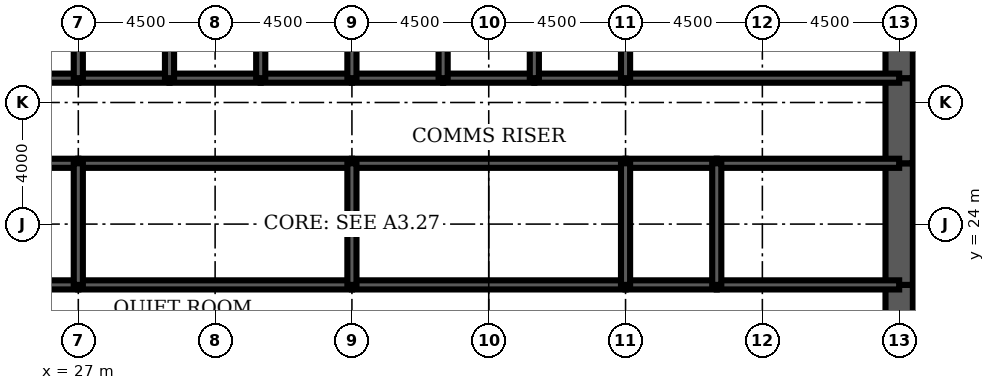
"""IFC4 building model, lengths in metres.
Left out: names, types, materials, properties, quantities, classifications, styles, units other than length and angle.
Written with IfcOpenShell. Run it as: python <this file> out.ifc"""

import sys

from ifc_helpers import new_model, si_unit, direction, frame, frame_2d, origin, place, context, subcontext, project, spatial, rectangle, extrude, element, fill, save


model = new_model("IFC4")
c1 = context("Model", 3, precision=1e-05, world=origin(), true_north=direction((0.0, 1.0)))
c2 = subcontext(c1, "Body", "Model", "MODEL_VIEW")
j1 = project(units=[si_unit("LENGTHUNIT", "METRE"), si_unit("PLANEANGLEUNIT", "RADIAN")], contexts=[c1])
p1 = place(None, origin())
s1 = spatial("IfcSite", under=j1, at=p1, CompositionType="ELEMENT")
p2 = place(p1, origin())
s2 = spatial("IfcBuilding", under=s1, at=p2, CompositionType="ELEMENT")
p3 = place(p2, frame((0.0, 0.0, 117.3)))
s3 = spatial("IfcBuildingStorey", under=s2, at=p3, CompositionType="ELEMENT", Elevation=117.3)
p4 = place(p3, frame((54.0, 19.2, 0.0), z_axis=(0.0, 0.0, 1.0), x_axis=(0.0, 1.0, 0.0)))
e1 = element("IfcWall", 1, at=p4, inside=s3, PredefinedType="SHEAR", context=c2, shape_type="SweptSolid", body=[
    extrude(rectangle(XDim=2.8, YDim=0.9, at=frame_2d((1.4, 0.0))), origin(), (0.0, 0.0, 1.0), 4.2),
])
p5 = place(p4, frame((0.4, 0.0, 0.0)))
e2 = element("IfcOpeningElement", 2, at=p5, cuts=e1, PredefinedType="OPENING", context=c2, shape_type="SweptSolid", body=[
    extrude(rectangle(XDim=1.8, YDim=2.1, at=frame_2d((0.9, 1.05))), frame((0.0, 0.46, 0.0), z_axis=(0.0, -1.0, 0.0), x_axis=(1.0, 0.0, 0.0)), (0.0, 0.0, 1.0), 0.92),
])
p6 = place(p3, frame((54.0, 22.0, 0.0), z_axis=(0.0, 0.0, 1.0), x_axis=(0.0, 1.0, 0.0)))
e3 = element("IfcWall", 3, at=p6, inside=s3, PredefinedType="SHEAR", context=c2, shape_type="SweptSolid", body=[
    extrude(rectangle(XDim=4.0, YDim=0.9, at=frame_2d((2.0, 0.0))), origin(), (0.0, 0.0, 1.0), 4.2),
])
p7 = place(p3, frame((54.0, 26.0, 0.0), z_axis=(0.0, 0.0, 1.0), x_axis=(0.0, 1.0, 0.0)))
e4 = element("IfcWall", 4, at=p7, inside=s3, PredefinedType="SHEAR", context=c2, shape_type="SweptSolid", body=[
    extrude(rectangle(XDim=2.8, YDim=0.9, at=frame_2d((1.4, 0.0))), origin(), (0.0, 0.0, 1.0), 4.2),
])
p8 = place(p7, frame((0.6, 0.0, 0.0)))
e5 = element("IfcOpeningElement", 5, at=p8, cuts=e4, PredefinedType="OPENING", context=c2, shape_type="SweptSolid", body=[
    extrude(rectangle(XDim=1.8, YDim=2.1, at=frame_2d((0.9, 1.05))), frame((0.0, 0.46, 0.0), z_axis=(0.0, -1.0, 0.0), x_axis=(1.0, 0.0, 0.0)), (0.0, 0.0, 1.0), 0.92),
])
p9 = place(p3, frame((54.0, 28.8, 0.0), z_axis=(0.0, 0.0, 1.0), x_axis=(0.0, 1.0, 0.0)))
e6 = element("IfcWall", 6, at=p9, inside=s3, PredefinedType="SHEAR", context=c2, shape_type="SweptSolid", body=[
    extrude(rectangle(XDim=3.2, YDim=0.9, at=frame_2d((1.6, 0.0))), origin(), (0.0, 0.0, 1.0), 4.2),
])
p10 = place(p3, frame((18.0, 28.8, 0.0), z_axis=(0.0, 0.0, 1.0), x_axis=(1.0, 0.0, 0.0)))
e7 = element("IfcWall", 7, at=p10, inside=s3, PredefinedType="SOLIDWALL", context=c2, shape_type="SweptSolid", body=[
    extrude(rectangle(XDim=9.0, YDim=0.3, at=frame_2d((4.5, 0.0))), origin(), (0.0, 0.0, 1.0), 4.2),
])
p11 = place(p10, frame((0.65, 0.0, 0.0)))
e8 = element("IfcOpeningElement", 8, at=p11, cuts=e7, PredefinedType="OPENING", context=c2, shape_type="SweptSolid", body=[
    extrude(rectangle(XDim=1.0, YDim=2.1, at=frame_2d((0.5, 1.05))), frame((0.0, 0.16, 0.0), z_axis=(0.0, -1.0, 0.0), x_axis=(1.0, 0.0, 0.0)), (0.0, 0.0, 1.0), 0.32),
])
p12 = place(p3, frame((27.0, 28.8, 0.0), z_axis=(0.0, 0.0, 1.0), x_axis=(1.0, 0.0, 0.0)))
e9 = element("IfcWall", 9, at=p12, inside=s3, PredefinedType="SOLIDWALL", context=c2, shape_type="SweptSolid", body=[
    extrude(rectangle(XDim=3.0, YDim=0.3, at=frame_2d((1.5, 0.0))), origin(), (0.0, 0.0, 1.0), 4.2),
])
p13 = place(p12, frame((0.95, 0.0, 0.0)))
e10 = element("IfcOpeningElement", 10, at=p13, cuts=e9, PredefinedType="OPENING", context=c2, shape_type="SweptSolid", body=[
    extrude(rectangle(XDim=1.1, YDim=2.2, at=frame_2d((0.55, 1.1))), frame((0.0, 0.16, 0.0), z_axis=(0.0, -1.0, 0.0), x_axis=(1.0, 0.0, 0.0)), (0.0, 0.0, 1.0), 0.32),
])
p14 = place(p3, frame((30.0, 28.8, 0.0), z_axis=(0.0, 0.0, 1.0), x_axis=(1.0, 0.0, 0.0)))
e11 = element("IfcWall", 11, at=p14, inside=s3, PredefinedType="SOLIDWALL", context=c2, shape_type="SweptSolid", body=[
    extrude(rectangle(XDim=3.0, YDim=0.3, at=frame_2d((1.5, 0.0))), origin(), (0.0, 0.0, 1.0), 4.2),
])
p15 = place(p14, frame((0.95, 0.0, 0.0)))
e12 = element("IfcOpeningElement", 12, at=p15, cuts=e11, PredefinedType="OPENING", context=c2, shape_type="SweptSolid", body=[
    extrude(rectangle(XDim=1.1, YDim=2.2, at=frame_2d((0.55, 1.1))), frame((0.0, 0.16, 0.0), z_axis=(0.0, -1.0, 0.0), x_axis=(1.0, 0.0, 0.0)), (0.0, 0.0, 1.0), 0.32),
])
p16 = place(p3, frame((33.0, 28.8, 0.0), z_axis=(0.0, 0.0, 1.0), x_axis=(1.0, 0.0, 0.0)))
e13 = element("IfcWall", 13, at=p16, inside=s3, PredefinedType="SOLIDWALL", context=c2, shape_type="SweptSolid", body=[
    extrude(rectangle(XDim=3.0, YDim=0.3, at=frame_2d((1.5, 0.0))), origin(), (0.0, 0.0, 1.0), 4.2),
])
p17 = place(p16, frame((0.95, 0.0, 0.0)))
e14 = element("IfcOpeningElement", 14, at=p17, cuts=e13, PredefinedType="OPENING", context=c2, shape_type="SweptSolid", body=[
    extrude(rectangle(XDim=1.1, YDim=2.2, at=frame_2d((0.55, 1.1))), frame((0.0, 0.16, 0.0), z_axis=(0.0, -1.0, 0.0), x_axis=(1.0, 0.0, 0.0)), (0.0, 0.0, 1.0), 0.32),
])
for number, where, z_axis, x_axis in (
    (15, (36.0, 28.8, 0.0), (0.0, 0.0, 1.0), (1.0, 0.0, 0.0)),
    (16, (39.0, 28.8, 0.0), (0.0, 0.0, 1.0), (1.0, 0.0, 0.0)),
):
    element("IfcWall", number, at=place(p3, frame(where, z_axis=z_axis, x_axis=x_axis)), inside=s3, PredefinedType="SOLIDWALL", context=c2, shape_type="SweptSolid", body=[
        extrude(rectangle(XDim=3.0, YDim=0.3, at=frame_2d((1.5, 0.0))), origin(), (0.0, 0.0, 1.0), 4.2),
    ])
p18 = place(p3, frame((42.0, 28.8, 0.0), z_axis=(0.0, 0.0, 1.0), x_axis=(1.0, 0.0, 0.0)))
e17 = element("IfcWall", 17, at=p18, inside=s3, PredefinedType="SOLIDWALL", context=c2, shape_type="SweptSolid", body=[
    extrude(rectangle(XDim=3.0, YDim=0.3, at=frame_2d((1.5, 0.0))), origin(), (0.0, 0.0, 1.0), 4.2),
])
p19 = place(p18, frame((0.95, 0.0, 0.0)))
e18 = element("IfcOpeningElement", 18, at=p19, cuts=e17, PredefinedType="OPENING", context=c2, shape_type="SweptSolid", body=[
    extrude(rectangle(XDim=1.1, YDim=2.2, at=frame_2d((0.55, 1.1))), frame((0.0, 0.16, 0.0), z_axis=(0.0, -1.0, 0.0), x_axis=(1.0, 0.0, 0.0)), (0.0, 0.0, 1.0), 0.32),
])
p20 = place(p3, frame((45.0, 28.8, 0.0), z_axis=(0.0, 0.0, 1.0), x_axis=(1.0, 0.0, 0.0)))
e19 = element("IfcWall", 19, at=p20, inside=s3, PredefinedType="SOLIDWALL", context=c2, shape_type="SweptSolid", body=[
    extrude(rectangle(XDim=9.0, YDim=0.3, at=frame_2d((4.5, 0.0))), origin(), (0.0, 0.0, 1.0), 4.2),
])
p21 = place(p20, frame((7.35, 0.0, 0.0)))
e20 = element("IfcOpeningElement", 20, at=p21, cuts=e19, PredefinedType="OPENING", context=c2, shape_type="SweptSolid", body=[
    extrude(rectangle(XDim=1.0, YDim=2.1, at=frame_2d((0.5, 1.05))), frame((0.0, 0.16, 0.0), z_axis=(0.0, -1.0, 0.0), x_axis=(1.0, 0.0, 0.0)), (0.0, 0.0, 1.0), 0.32),
])
p22 = place(p3, frame((24.0, 22.0, 0.0), z_axis=(0.0, 0.0, 1.0), x_axis=(1.0, 0.0, 0.0)))
e21 = element("IfcWall", 21, at=p22, inside=s3, PredefinedType="SOLIDWALL", context=c2, shape_type="SweptSolid", body=[
    extrude(rectangle(XDim=3.0, YDim=0.3, at=frame_2d((1.5, 0.0))), origin(), (0.0, 0.0, 1.0), 4.2),
])
p23 = place(p22, frame((1.0, 0.0, 0.0)))
e22 = element("IfcOpeningElement", 22, at=p23, cuts=e21, PredefinedType="OPENING", context=c2, shape_type="SweptSolid", body=[
    extrude(rectangle(XDim=1.0, YDim=2.1, at=frame_2d((0.5, 1.05))), frame((0.0, 0.16, 0.0), z_axis=(0.0, -1.0, 0.0), x_axis=(1.0, 0.0, 0.0)), (0.0, 0.0, 1.0), 0.32),
])
p24 = place(p3, frame((27.0, 22.0, 0.0), z_axis=(0.0, 0.0, 1.0), x_axis=(1.0, 0.0, 0.0)))
e23 = element("IfcWall", 23, at=p24, inside=s3, PredefinedType="SOLIDWALL", context=c2, shape_type="SweptSolid", body=[
    extrude(rectangle(XDim=9.0, YDim=0.3, at=frame_2d((4.5, 0.0))), origin(), (0.0, 0.0, 1.0), 4.2),
])
p25 = place(p24, frame((4.0, 0.0, 0.0)))
e24 = element("IfcOpeningElement", 24, at=p25, cuts=e23, PredefinedType="OPENING", context=c2, shape_type="SweptSolid", body=[
    extrude(rectangle(XDim=1.0, YDim=2.1, at=frame_2d((0.5, 1.05))), frame((0.0, 0.16, 0.0), z_axis=(0.0, -1.0, 0.0), x_axis=(1.0, 0.0, 0.0)), (0.0, 0.0, 1.0), 0.32),
])
p26 = place(p3, frame((36.0, 22.0, 0.0), z_axis=(0.0, 0.0, 1.0), x_axis=(1.0, 0.0, 0.0)))
e25 = element("IfcWall", 25, at=p26, inside=s3, PredefinedType="SOLIDWALL", context=c2, shape_type="SweptSolid", body=[
    extrude(rectangle(XDim=9.0, YDim=0.3, at=frame_2d((4.5, 0.0))), origin(), (0.0, 0.0, 1.0), 4.2),
])
p27 = place(p26, frame((4.0, 0.0, 0.0)))
e26 = element("IfcOpeningElement", 26, at=p27, cuts=e25, PredefinedType="OPENING", context=c2, shape_type="SweptSolid", body=[
    extrude(rectangle(XDim=1.0, YDim=2.1, at=frame_2d((0.5, 1.05))), frame((0.0, 0.16, 0.0), z_axis=(0.0, -1.0, 0.0), x_axis=(1.0, 0.0, 0.0)), (0.0, 0.0, 1.0), 0.32),
])
p28 = place(p3, frame((45.0, 22.0, 0.0), z_axis=(0.0, 0.0, 1.0), x_axis=(1.0, 0.0, 0.0)))
e27 = element("IfcWall", 27, at=p28, inside=s3, PredefinedType="SOLIDWALL", context=c2, shape_type="SweptSolid", body=[
    extrude(rectangle(XDim=3.0, YDim=0.3, at=frame_2d((1.5, 0.0))), origin(), (0.0, 0.0, 1.0), 4.2),
])
p29 = place(p28, frame((1.0, 0.0, 0.0)))
e28 = element("IfcOpeningElement", 28, at=p29, cuts=e27, PredefinedType="OPENING", context=c2, shape_type="SweptSolid", body=[
    extrude(rectangle(XDim=1.0, YDim=2.1, at=frame_2d((0.5, 1.05))), frame((0.0, 0.16, 0.0), z_axis=(0.0, -1.0, 0.0), x_axis=(1.0, 0.0, 0.0)), (0.0, 0.0, 1.0), 0.32),
])
p30 = place(p3, frame((48.0, 22.0, 0.0), z_axis=(0.0, 0.0, 1.0), x_axis=(1.0, 0.0, 0.0)))
e29 = element("IfcWall", 29, at=p30, inside=s3, PredefinedType="SOLIDWALL", context=c2, shape_type="SweptSolid", body=[
    extrude(rectangle(XDim=6.0, YDim=0.3, at=frame_2d((3.0, 0.0))), origin(), (0.0, 0.0, 1.0), 4.2),
])
p31 = place(p30, frame((2.0, 0.0, 0.0)))
e30 = element("IfcOpeningElement", 30, at=p31, cuts=e29, PredefinedType="OPENING", context=c2, shape_type="SweptSolid", body=[
    extrude(rectangle(XDim=1.0, YDim=2.1, at=frame_2d((0.5, 1.05))), frame((0.0, 0.16, 0.0), z_axis=(0.0, -1.0, 0.0), x_axis=(1.0, 0.0, 0.0)), (0.0, 0.0, 1.0), 0.32),
])
p32 = place(p30, frame((4.0, 0.0, 0.0)))
e31 = element("IfcOpeningElement", 31, at=p32, cuts=e29, PredefinedType="OPENING", context=c2, shape_type="SweptSolid", body=[
    extrude(rectangle(XDim=1.0, YDim=2.1, at=frame_2d((0.5, 1.05))), frame((0.0, 0.16, 0.0), z_axis=(0.0, -1.0, 0.0), x_axis=(1.0, 0.0, 0.0)), (0.0, 0.0, 1.0), 0.32),
])
p33 = place(p3, frame((24.0, 26.0, 0.0), z_axis=(0.0, 0.0, 1.0), x_axis=(1.0, 0.0, 0.0)))
e32 = element("IfcWall", 32, at=p33, inside=s3, PredefinedType="SOLIDWALL", context=c2, shape_type="SweptSolid", body=[
    extrude(rectangle(XDim=3.0, YDim=0.3, at=frame_2d((1.5, 0.0))), origin(), (0.0, 0.0, 1.0), 4.2),
])
for number, where, z_axis, x_axis in (
    (33, (27.0, 26.0, 0.0), (0.0, 0.0, 1.0), (1.0, 0.0, 0.0)),
    (34, (36.0, 26.0, 0.0), (0.0, 0.0, 1.0), (1.0, 0.0, 0.0)),
):
    element("IfcWall", number, at=place(p3, frame(where, z_axis=z_axis, x_axis=x_axis)), inside=s3, PredefinedType="SOLIDWALL", context=c2, shape_type="SweptSolid", body=[
        extrude(rectangle(XDim=9.0, YDim=0.3, at=frame_2d((4.5, 0.0))), origin(), (0.0, 0.0, 1.0), 4.2),
    ])
p34 = place(p3, frame((45.0, 26.0, 0.0), z_axis=(0.0, 0.0, 1.0), x_axis=(1.0, 0.0, 0.0)))
e35 = element("IfcWall", 35, at=p34, inside=s3, PredefinedType="SOLIDWALL", context=c2, shape_type="SweptSolid", body=[
    extrude(rectangle(XDim=3.0, YDim=0.3, at=frame_2d((1.5, 0.0))), origin(), (0.0, 0.0, 1.0), 4.2),
])
p35 = place(p3, frame((48.0, 26.0, 0.0), z_axis=(0.0, 0.0, 1.0), x_axis=(1.0, 0.0, 0.0)))
e36 = element("IfcWall", 36, at=p35, inside=s3, PredefinedType="SOLIDWALL", context=c2, shape_type="SweptSolid", body=[
    extrude(rectangle(XDim=6.0, YDim=0.3, at=frame_2d((3.0, 0.0))), origin(), (0.0, 0.0, 1.0), 4.2),
])
for number, where, z_axis, x_axis in (
    (37, (27.0, 28.8, 0.0), (0.0, 0.0, 1.0), (0.0, 1.0, 0.0)),
    (38, (30.0, 28.8, 0.0), (0.0, 0.0, 1.0), (0.0, 1.0, 0.0)),
    (39, (33.0, 28.8, 0.0), (0.0, 0.0, 1.0), (0.0, 1.0, 0.0)),
    (40, (36.0, 28.8, 0.0), (0.0, 0.0, 1.0), (0.0, 1.0, 0.0)),
    (41, (39.0, 28.8, 0.0), (0.0, 0.0, 1.0), (0.0, 1.0, 0.0)),
    (42, (42.0, 28.8, 0.0), (0.0, 0.0, 1.0), (0.0, 1.0, 0.0)),
    (43, (45.0, 28.8, 0.0), (0.0, 0.0, 1.0), (0.0, 1.0, 0.0)),
):
    element("IfcWall", number, at=place(p3, frame(where, z_axis=z_axis, x_axis=x_axis)), inside=s3, PredefinedType="SOLIDWALL", context=c2, shape_type="SweptSolid", body=[
        extrude(rectangle(XDim=3.2, YDim=0.3, at=frame_2d((1.6, 0.0))), origin(), (0.0, 0.0, 1.0), 4.2),
    ])
for number, where, z_axis, x_axis in (
    (44, (27.0, 22.0, 0.0), (0.0, 0.0, 1.0), (0.0, 1.0, 0.0)),
    (45, (36.0, 22.0, 0.0), (0.0, 0.0, 1.0), (0.0, 1.0, 0.0)),
    (46, (45.0, 22.0, 0.0), (0.0, 0.0, 1.0), (0.0, 1.0, 0.0)),
    (47, (48.0, 22.0, 0.0), (0.0, 0.0, 1.0), (0.0, 1.0, 0.0)),
):
    element("IfcWall", number, at=place(p3, frame(where, z_axis=z_axis, x_axis=x_axis)), inside=s3, PredefinedType="SOLIDWALL", context=c2, shape_type="SweptSolid", body=[
        extrude(rectangle(XDim=4.0, YDim=0.3, at=frame_2d((2.0, 0.0))), origin(), (0.0, 0.0, 1.0), 4.2),
    ])
p36 = place(p3, frame((38.5, 22.15, 0.0), z_axis=(0.0, 0.0, 1.0), x_axis=(0.0, 1.0, 0.0)))
e48 = element("IfcWall", 48, at=p36, inside=s3, PredefinedType="PARTITIONING", context=c2, shape_type="SweptSolid", body=[
    extrude(rectangle(XDim=3.7, YDim=0.15, at=frame_2d((1.85, 0.0))), origin(), (0.0, 0.0, 1.0), 3.0),
])
p37 = place(p36, frame((2.2, 0.0, 0.0)))
e49 = element("IfcOpeningElement", 49, at=p37, cuts=e48, PredefinedType="OPENING", context=c2, shape_type="SweptSolid", body=[
    extrude(rectangle(XDim=1.0, YDim=2.1, at=frame_2d((0.5, 1.05))), frame((0.0, 0.085, 0.0), z_axis=(0.0, -1.0, 0.0), x_axis=(1.0, 0.0, 0.0)), (0.0, 0.0, 1.0), 0.17),
])
p38 = place(p3, frame((51.375, 22.15, 0.0), z_axis=(0.0, 0.0, 1.0), x_axis=(0.0, 1.0, 0.0)))
e50 = element("IfcWall", 50, at=p38, inside=s3, PredefinedType="PARTITIONING", context=c2, shape_type="SweptSolid", body=[
    extrude(rectangle(XDim=3.7, YDim=0.15, at=frame_2d((1.85, 0.0))), origin(), (0.0, 0.0, 1.0), 3.0),
])
p39 = place(p3, frame((47.7, 26.15, 0.0), z_axis=(0.0, 0.0, 1.0), x_axis=(0.0, 1.0, 0.0)))
e51 = element("IfcWall", 51, at=p39, inside=s3, PredefinedType="PARTITIONING", context=c2, shape_type="SweptSolid", body=[
    extrude(rectangle(XDim=2.5, YDim=0.15, at=frame_2d((1.25, 0.0))), origin(), (0.0, 0.0, 1.0), 3.0),
])
p40 = place(p39, frame((1.15, 0.0, 0.0)))
e52 = element("IfcOpeningElement", 52, at=p40, cuts=e51, PredefinedType="OPENING", context=c2, shape_type="SweptSolid", body=[
    extrude(rectangle(XDim=1.0, YDim=2.1, at=frame_2d((0.5, 1.05))), frame((0.0, 0.085, 0.0), z_axis=(0.0, -1.0, 0.0), x_axis=(1.0, 0.0, 0.0)), (0.0, 0.0, 1.0), 0.17),
])
p41 = place(p37, origin())
e53 = element("IfcDoor", 53, at=p41, inside=s3, OperationType="SINGLE_SWING_RIGHT", PredefinedType="DOOR", context=c2, shape_type="SweptSolid", body=[
    extrude(rectangle(XDim=1.0, YDim=2.1, at=frame_2d((0.5, 1.05))), frame((0.0, 0.025, 0.0), z_axis=(0.0, -1.0, 0.0), x_axis=(1.0, 0.0, 0.0)), (0.0, 0.0, 1.0), 0.05),
])
fill(e49, e53)
p42 = place(p40, origin())
e54 = element("IfcDoor", 54, at=p42, inside=s3, OperationType="SINGLE_SWING_RIGHT", PredefinedType="DOOR", context=c2, shape_type="SweptSolid", body=[
    extrude(rectangle(XDim=1.0, YDim=2.1, at=frame_2d((0.5, 1.05))), frame((0.0, 0.025, 0.0), z_axis=(0.0, -1.0, 0.0), x_axis=(1.0, 0.0, 0.0)), (0.0, 0.0, 1.0), 0.05),
])
fill(e52, e54)
p43 = place(p19, origin())
e55 = element("IfcDoor", 55, at=p43, inside=s3, OperationType="DOUBLE_DOOR_SLIDING", PredefinedType="USERDEFINED", context=c2, shape_type="SweptSolid", body=[
    extrude(rectangle(XDim=1.1, YDim=2.2, at=frame_2d((0.55, 1.1))), frame((0.0, 0.025, 0.0), z_axis=(0.0, -1.0, 0.0), x_axis=(1.0, 0.0, 0.0)), (0.0, 0.0, 1.0), 0.05),
])
fill(e18, e55)
p44 = place(p13, origin())
e56 = element("IfcDoor", 56, at=p44, inside=s3, OperationType="DOUBLE_DOOR_SLIDING", PredefinedType="USERDEFINED", context=c2, shape_type="SweptSolid", body=[
    extrude(rectangle(XDim=1.1, YDim=2.2, at=frame_2d((0.55, 1.1))), frame((0.0, 0.025, 0.0), z_axis=(0.0, -1.0, 0.0), x_axis=(1.0, 0.0, 0.0)), (0.0, 0.0, 1.0), 0.05),
])
fill(e10, e56)
p45 = place(p15, origin())
e57 = element("IfcDoor", 57, at=p45, inside=s3, OperationType="DOUBLE_DOOR_SLIDING", PredefinedType="USERDEFINED", context=c2, shape_type="SweptSolid", body=[
    extrude(rectangle(XDim=1.1, YDim=2.2, at=frame_2d((0.55, 1.1))), frame((0.0, 0.025, 0.0), z_axis=(0.0, -1.0, 0.0), x_axis=(1.0, 0.0, 0.0)), (0.0, 0.0, 1.0), 0.05),
])
fill(e12, e57)
p46 = place(p17, origin())
e58 = element("IfcDoor", 58, at=p46, inside=s3, OperationType="DOUBLE_DOOR_SLIDING", PredefinedType="USERDEFINED", context=c2, shape_type="SweptSolid", body=[
    extrude(rectangle(XDim=1.1, YDim=2.2, at=frame_2d((0.55, 1.1))), frame((0.0, 0.025, 0.0), z_axis=(0.0, -1.0, 0.0), x_axis=(1.0, 0.0, 0.0)), (0.0, 0.0, 1.0), 0.05),
])
fill(e14, e58)
p47 = place(p21, origin())
e59 = element("IfcDoor", 59, at=p47, inside=s3, OperationType="SINGLE_SWING_RIGHT", PredefinedType="DOOR", context=c2, shape_type="SweptSolid", body=[
    extrude(rectangle(XDim=1.0, YDim=2.1, at=frame_2d((0.5, 1.05))), frame((0.0, 0.025, 0.0), z_axis=(0.0, -1.0, 0.0), x_axis=(1.0, 0.0, 0.0)), (0.0, 0.0, 1.0), 0.05),
])
fill(e20, e59)
p48 = place(p5, origin())
e60 = element("IfcDoor", 60, at=p48, inside=s3, OperationType="SINGLE_SWING_LEFT", PredefinedType="DOOR", context=c2, shape_type="SweptSolid", body=[
    extrude(rectangle(XDim=1.8, YDim=2.1, at=frame_2d((0.9, 1.05))), frame((0.0, 0.45, 0.0), z_axis=(0.0, -1.0, 0.0), x_axis=(1.0, 0.0, 0.0)), (0.0, 0.0, 1.0), 0.899),
])
fill(e2, e60)
p49 = place(p8, origin())
e61 = element("IfcDoor", 61, at=p49, inside=s3, OperationType="SINGLE_SWING_LEFT", PredefinedType="DOOR", context=c2, shape_type="SweptSolid", body=[
    extrude(rectangle(XDim=1.8, YDim=2.1, at=frame_2d((0.9, 1.05))), frame((0.0, 0.45, 0.0), z_axis=(0.0, -1.0, 0.0), x_axis=(1.0, 0.0, 0.0)), (0.0, 0.0, 1.0), 0.899),
])
fill(e5, e61)
p50 = place(p25, origin())
e62 = element("IfcDoor", 62, at=p50, inside=s3, OperationType="SINGLE_SWING_LEFT", PredefinedType="DOOR", context=c2, shape_type="SweptSolid", body=[
    extrude(rectangle(XDim=1.0, YDim=2.1, at=frame_2d((0.5, 1.05))), frame((0.0, 0.025, 0.0), z_axis=(0.0, -1.0, 0.0), x_axis=(1.0, 0.0, 0.0)), (0.0, 0.0, 1.0), 0.05),
])
fill(e24, e62)
p51 = place(p27, origin())
e63 = element("IfcDoor", 63, at=p51, inside=s3, OperationType="SINGLE_SWING_LEFT", PredefinedType="DOOR", context=c2, shape_type="SweptSolid", body=[
    extrude(rectangle(XDim=1.0, YDim=2.1, at=frame_2d((0.5, 1.05))), frame((0.0, 0.025, 0.0), z_axis=(0.0, -1.0, 0.0), x_axis=(1.0, 0.0, 0.0)), (0.0, 0.0, 1.0), 0.05),
])
fill(e26, e63)
p52 = place(p29, origin())
e64 = element("IfcDoor", 64, at=p52, inside=s3, OperationType="SINGLE_SWING_LEFT", PredefinedType="DOOR", context=c2, shape_type="SweptSolid", body=[
    extrude(rectangle(XDim=1.0, YDim=2.1, at=frame_2d((0.5, 1.05))), frame((0.0, 0.025, 0.0), z_axis=(0.0, -1.0, 0.0), x_axis=(1.0, 0.0, 0.0)), (0.0, 0.0, 1.0), 0.05),
])
fill(e28, e64)
p53 = place(p31, origin())
e65 = element("IfcDoor", 65, at=p53, inside=s3, OperationType="SINGLE_SWING_LEFT", PredefinedType="DOOR", context=c2, shape_type="SweptSolid", body=[
    extrude(rectangle(XDim=1.0, YDim=2.1, at=frame_2d((0.5, 1.05))), frame((0.0, 0.025, 0.0), z_axis=(0.0, -1.0, 0.0), x_axis=(1.0, 0.0, 0.0)), (0.0, 0.0, 1.0), 0.05),
])
fill(e30, e65)
p54 = place(p32, origin())
e66 = element("IfcDoor", 66, at=p54, inside=s3, OperationType="SINGLE_SWING_RIGHT", PredefinedType="DOOR", context=c2, shape_type="SweptSolid", body=[
    extrude(rectangle(XDim=1.0, YDim=2.1, at=frame_2d((0.5, 1.05))), frame((0.0, 0.025, 0.0), z_axis=(0.0, -1.0, 0.0), x_axis=(1.0, 0.0, 0.0)), (0.0, 0.0, 1.0), 0.05),
])
fill(e31, e66)
save(model, sys.argv[1])
